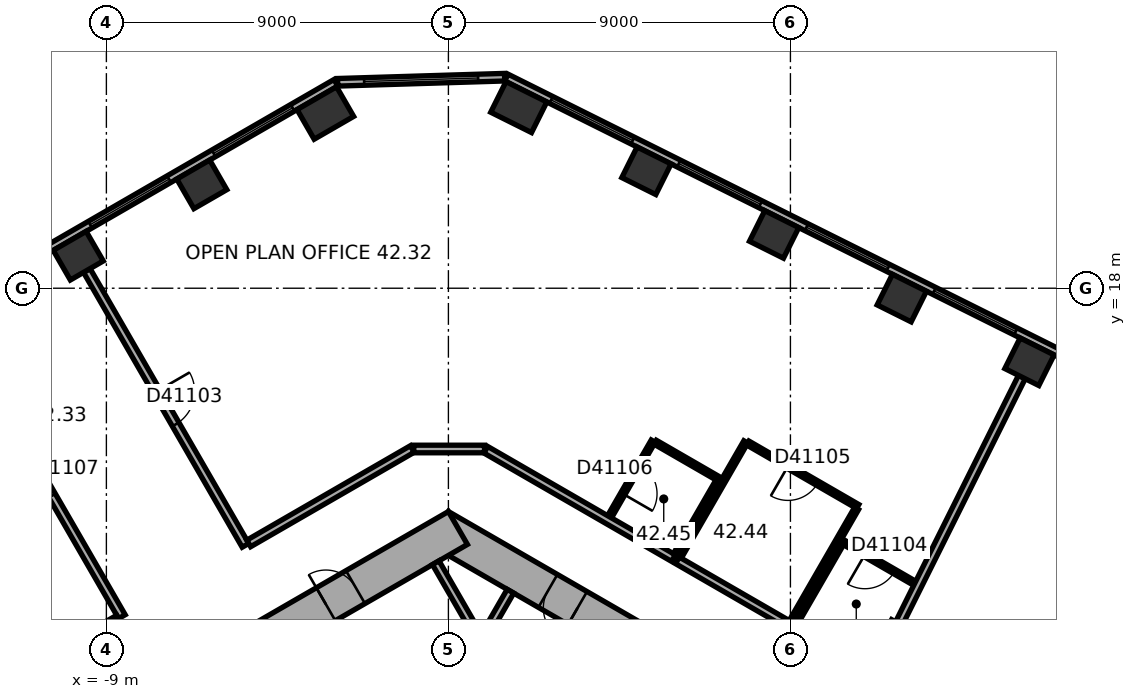
"""IFC4 building model, lengths in metres.
Left out: names, types, materials, properties, quantities, classifications, styles, units other than length and angle.
Written with IfcOpenShell. Run it as: python <this file> out.ifc"""

import sys

from ifc_helpers import new_model, si_unit, direction, frame, frame_2d, origin, origin_2d, place, context, subcontext, project, spatial, rectangle, extrude, element, fill, save


model = new_model("IFC4")
c1 = context("Model", 3, precision=1e-05, world=origin(), true_north=direction((0.0, 1.0)))
c2 = subcontext(c1, "Body", "Model", "MODEL_VIEW")
j1 = project(units=[si_unit("LENGTHUNIT", "METRE"), si_unit("PLANEANGLEUNIT", "RADIAN")], contexts=[c1])
p1 = place(None, origin())
s1 = spatial("IfcSite", under=j1, at=p1, CompositionType="ELEMENT")
p2 = place(p1, origin())
s2 = spatial("IfcBuilding", under=s1, at=p2, CompositionType="ELEMENT")
p3 = place(p2, frame((0.0, 0.0, 172.5)))
s3 = spatial("IfcBuildingStorey", under=s2, at=p3, CompositionType="ELEMENT", Elevation=172.5)
for number, where, z_axis, x_axis in (
    (1, (15.29, 16.065, 0.0), (0.0, 0.0, 1.0), (-0.895, 0.446, 0.0)),
    (2, (11.931, 17.74, 0.0), (0.0, 0.0, 1.0), (-0.895, 0.446, 0.0)),
    (3, (8.571, 19.416, 0.0), (0.0, 0.0, 1.0), (-0.895, 0.446, 0.0)),
    (4, (5.211, 21.091, 0.0), (0.0, 0.0, 1.0), (-0.895, 0.446, 0.0)),
):
    element("IfcColumn", number, at=place(p3, frame(where, z_axis=z_axis, x_axis=x_axis)), inside=s3, PredefinedType="COLUMN", context=c2, shape_type="SweptSolid", body=[
        extrude(rectangle(XDim=1.0, YDim=0.9, at=origin_2d()), origin(), (0.0, 0.0, 1.0), 3.7),
    ])
for number, where, z_axis, x_axis in (
    (5, (1.852, 22.766, 0.0), (0.0, 0.0, 1.0), (-0.895, 0.446, 0.0)),
    (6, (-3.238, 22.61, 0.0), (0.0, 0.0, 1.0), (-0.866, -0.5, 0.0)),
):
    element("IfcColumn", number, at=place(p3, frame(where, z_axis=z_axis, x_axis=x_axis)), inside=s3, PredefinedType="COLUMN", context=c2, shape_type="SweptSolid", body=[
        extrude(rectangle(XDim=1.2, YDim=0.9, at=origin_2d()), origin(), (0.0, 0.0, 1.0), 3.7),
    ])
for number, where, z_axis, x_axis in (
    (7, (-6.489, 20.733, 0.0), (0.0, 0.0, 1.0), (-0.866, -0.5, 0.0)),
    (8, (-9.74, 18.856, 0.0), (0.0, 0.0, 1.0), (-0.866, -0.5, 0.0)),
):
    element("IfcColumn", number, at=place(p3, frame(where, z_axis=z_axis, x_axis=x_axis)), inside=s3, PredefinedType="COLUMN", context=c2, shape_type="SweptSolid", body=[
        extrude(rectangle(XDim=1.0, YDim=0.9, at=origin_2d()), origin(), (0.0, 0.0, 1.0), 3.7),
    ])
p4 = place(p3, frame((10.25, 5.629, 0.0), z_axis=(0.0, 0.0, 1.0), x_axis=(-0.866022616891, 0.50000482701, 0.0)))
e9 = element("IfcWall", 9, at=p4, inside=s3, PredefinedType="SHEAR", context=c2, shape_type="SweptSolid", body=[
    extrude(rectangle(XDim=12.125, YDim=1.0, at=frame_2d((6.062, 0.0))), origin(), (0.0, 0.0, 1.0), 3.7),
])
p5 = place(p4, frame((4.012, 0.0, 0.0)))
e10 = element("IfcOpeningElement", 10, at=p5, cuts=e9, PredefinedType="OPENING", context=c2, shape_type="SweptSolid", body=[
    extrude(rectangle(XDim=0.9, YDim=2.1, at=frame_2d((0.45, 1.05))), frame((0.0, 0.51, 0.0), z_axis=(0.0, -1.0, 0.0), x_axis=(1.0, 0.0, 0.0)), (0.0, 0.0, 1.0), 1.02),
])
p6 = place(p4, frame((7.912, 0.0, 0.0)))
e11 = element("IfcOpeningElement", 11, at=p6, cuts=e9, PredefinedType="OPENING", context=c2, shape_type="SweptSolid", body=[
    extrude(rectangle(XDim=0.9, YDim=2.1, at=frame_2d((0.45, 1.05))), frame((0.0, 0.51, 0.0), z_axis=(0.0, -1.0, 0.0), x_axis=(1.0, 0.0, 0.0)), (0.0, 0.0, 1.0), 1.02),
])
p7 = place(p3, frame((0.25, 11.691, 0.0), z_axis=(0.0, 0.0, 1.0), x_axis=(-0.866022616891, -0.50000482701, 0.0)))
e12 = element("IfcWall", 12, at=p7, inside=s3, PredefinedType="SHEAR", context=c2, shape_type="SweptSolid", body=[
    extrude(rectangle(XDim=12.125, YDim=1.0, at=frame_2d((6.062, 0.0))), origin(), (0.0, 0.0, 1.0), 3.7),
])
p8 = place(p7, frame((6.262, 0.0, 0.0)))
e13 = element("IfcOpeningElement", 13, at=p8, cuts=e12, PredefinedType="OPENING", context=c2, shape_type="SweptSolid", body=[
    extrude(rectangle(XDim=1.5, YDim=2.1, at=frame_2d((0.75, 1.05))), frame((0.0, 0.51, 0.0), z_axis=(0.0, -1.0, 0.0), x_axis=(1.0, 0.0, 0.0)), (0.0, 0.0, 1.0), 1.02),
])
p9 = place(p7, frame((3.112, 0.0, 0.0)))
e14 = element("IfcOpeningElement", 14, at=p9, cuts=e12, PredefinedType="OPENING", context=c2, shape_type="SweptSolid", body=[
    extrude(rectangle(XDim=0.9, YDim=2.1, at=frame_2d((0.45, 1.05))), frame((0.0, 0.51, 0.0), z_axis=(0.0, -1.0, 0.0), x_axis=(1.0, 0.0, 0.0)), (0.0, 0.0, 1.0), 1.02),
])
p10 = place(p3, frame((19.464, 14.599, 0.0), z_axis=(0.0, 0.0, 1.0), x_axis=(-0.894935755043, 0.446195018289, 0.0)))
e15 = element("IfcWall", 15, at=p10, inside=s3, PredefinedType="STANDARD", context=c2, shape_type="SweptSolid", body=[
    extrude(rectangle(XDim=20.044, YDim=0.2, at=frame_2d((10.022, 0.0))), origin(), (0.0, 0.0, 1.0), 3.7),
])
p11 = place(p10, frame((1.313, 0.0, 0.9)))
e16 = element("IfcOpeningElement", 16, at=p11, cuts=e15, PredefinedType="OPENING", context=c2, shape_type="SweptSolid", body=[
    extrude(rectangle(XDim=2.4, YDim=2.0, at=frame_2d((1.2, 1.0))), frame((0.0, 0.11, 0.0), z_axis=(0.0, -1.0, 0.0), x_axis=(1.0, 0.0, 0.0)), (0.0, 0.0, 1.0), 0.22),
])
p12 = place(p10, frame((5.067, 0.0, 0.9)))
e17 = element("IfcOpeningElement", 17, at=p12, cuts=e15, PredefinedType="OPENING", context=c2, shape_type="SweptSolid", body=[
    extrude(rectangle(XDim=2.4, YDim=2.0, at=frame_2d((1.2, 1.0))), frame((0.0, 0.11, 0.0), z_axis=(0.0, -1.0, 0.0), x_axis=(1.0, 0.0, 0.0)), (0.0, 0.0, 1.0), 0.22),
])
p13 = place(p10, frame((8.821, 0.0, 0.9)))
e18 = element("IfcOpeningElement", 18, at=p13, cuts=e15, PredefinedType="OPENING", context=c2, shape_type="SweptSolid", body=[
    extrude(rectangle(XDim=2.4, YDim=2.0, at=frame_2d((1.2, 1.0))), frame((0.0, 0.11, 0.0), z_axis=(0.0, -1.0, 0.0), x_axis=(1.0, 0.0, 0.0)), (0.0, 0.0, 1.0), 0.22),
])
p14 = place(p10, frame((12.575, 0.0, 0.9)))
e19 = element("IfcOpeningElement", 19, at=p14, cuts=e15, PredefinedType="OPENING", context=c2, shape_type="SweptSolid", body=[
    extrude(rectangle(XDim=2.4, YDim=2.0, at=frame_2d((1.2, 1.0))), frame((0.0, 0.11, 0.0), z_axis=(0.0, -1.0, 0.0), x_axis=(1.0, 0.0, 0.0)), (0.0, 0.0, 1.0), 0.22),
])
p15 = place(p10, frame((16.329, 0.0, 0.9)))
e20 = element("IfcOpeningElement", 20, at=p15, cuts=e15, PredefinedType="OPENING", context=c2, shape_type="SweptSolid", body=[
    extrude(rectangle(XDim=2.4, YDim=2.0, at=frame_2d((1.2, 1.0))), frame((0.0, 0.11, 0.0), z_axis=(0.0, -1.0, 0.0), x_axis=(1.0, 0.0, 0.0)), (0.0, 0.0, 1.0), 0.22),
])
p16 = place(p3, frame((1.479, 23.553, 0.0), z_axis=(0.0, 0.0, 1.0), x_axis=(-0.999534786117, -0.03049936625, 0.0)))
e21 = element("IfcWall", 21, at=p16, inside=s3, PredefinedType="STANDARD", context=c2, shape_type="SweptSolid", body=[
    extrude(rectangle(XDim=4.395, YDim=0.2, at=frame_2d((2.197, 0.0))), origin(), (0.0, 0.0, 1.0), 3.7),
])
p17 = place(p16, frame((0.698, 0.0, 0.9)))
e22 = element("IfcOpeningElement", 22, at=p17, cuts=e21, PredefinedType="OPENING", context=c2, shape_type="SweptSolid", body=[
    extrude(rectangle(XDim=3.0, YDim=2.0, at=frame_2d((1.5, 1.0))), frame((0.0, 0.11, 0.0), z_axis=(0.0, -1.0, 0.0), x_axis=(1.0, 0.0, 0.0)), (0.0, 0.0, 1.0), 0.22),
])
p18 = place(p3, frame((-2.961, 23.405, 0.0), z_axis=(0.0, 0.0, 1.0), x_axis=(-0.866023315909, -0.500003616288, 0.0)))
e23 = element("IfcWall", 23, at=p18, inside=s3, PredefinedType="STANDARD", context=c2, shape_type="SweptSolid", body=[
    extrude(rectangle(XDim=20.044, YDim=0.2, at=frame_2d((10.022, 0.0))), origin(), (0.0, 0.0, 1.0), 3.7),
])
p19 = place(p18, frame((1.314, 0.0, 0.9)))
e24 = element("IfcOpeningElement", 24, at=p19, cuts=e23, PredefinedType="OPENING", context=c2, shape_type="SweptSolid", body=[
    extrude(rectangle(XDim=2.4, YDim=2.0, at=frame_2d((1.2, 1.0))), frame((0.0, 0.11, 0.0), z_axis=(0.0, -1.0, 0.0), x_axis=(1.0, 0.0, 0.0)), (0.0, 0.0, 1.0), 0.22),
])
p20 = place(p18, frame((5.069, 0.0, 0.9)))
e25 = element("IfcOpeningElement", 25, at=p20, cuts=e23, PredefinedType="OPENING", context=c2, shape_type="SweptSolid", body=[
    extrude(rectangle(XDim=2.4, YDim=2.0, at=frame_2d((1.2, 1.0))), frame((0.0, 0.11, 0.0), z_axis=(0.0, -1.0, 0.0), x_axis=(1.0, 0.0, 0.0)), (0.0, 0.0, 1.0), 0.22),
])
p21 = place(p18, frame((8.823, 0.0, 0.9)))
e26 = element("IfcOpeningElement", 26, at=p21, cuts=e23, PredefinedType="OPENING", context=c2, shape_type="SweptSolid", body=[
    extrude(rectangle(XDim=2.4, YDim=2.0, at=frame_2d((1.2, 1.0))), frame((0.0, 0.11, 0.0), z_axis=(0.0, -1.0, 0.0), x_axis=(1.0, 0.0, 0.0)), (0.0, 0.0, 1.0), 0.22),
])
p22 = place(p18, frame((12.577, 0.0, 0.9)))
e27 = element("IfcOpeningElement", 27, at=p22, cuts=e23, PredefinedType="OPENING", context=c2, shape_type="SweptSolid", body=[
    extrude(rectangle(XDim=2.4, YDim=2.0, at=frame_2d((1.2, 1.0))), frame((0.0, 0.11, 0.0), z_axis=(0.0, -1.0, 0.0), x_axis=(1.0, 0.0, 0.0)), (0.0, 0.0, 1.0), 0.22),
])
p23 = place(p18, frame((16.331, 0.0, 0.9)))
e28 = element("IfcOpeningElement", 28, at=p23, cuts=e23, PredefinedType="OPENING", context=c2, shape_type="SweptSolid", body=[
    extrude(rectangle(XDim=2.4, YDim=2.0, at=frame_2d((1.2, 1.0))), frame((0.0, 0.11, 0.0), z_axis=(0.0, -1.0, 0.0), x_axis=(1.0, 0.0, 0.0)), (0.0, 0.0, 1.0), 0.22),
])
p24 = place(p3, frame((0.532, 8.122, 0.0), z_axis=(0.0, 0.0, 1.0), x_axis=(0.500077893725, 0.86598042715, 0.0)))
e29 = element("IfcWall", 29, at=p24, inside=s3, PredefinedType="PARTITIONING", context=c2, shape_type="SweptSolid", body=[
    extrude(rectangle(XDim=2.2, YDim=0.2, at=frame_2d((1.1, 0.0))), origin(), (0.0, 0.0, 1.0), 3.42),
])
p25 = place(p3, frame((0.767, 8.872, 0.0), z_axis=(0.0, 0.0, 1.0), x_axis=(-0.499994660107, 0.866028486751, 0.0)))
e30 = element("IfcWall", 30, at=p25, inside=s3, PredefinedType="PARTITIONING", context=c2, shape_type="SweptSolid", body=[
    extrude(rectangle(XDim=2.2, YDim=0.2, at=frame_2d((1.1, 0.0))), origin(), (0.0, 0.0, 1.0), 3.42),
])
p26 = place(p3, frame((-12.766, 16.589, 0.0), z_axis=(0.0, 0.0, 1.0), x_axis=(0.500010139422, -0.866019549707, 0.0)))
e31 = element("IfcWall", 31, at=p26, inside=s3, PredefinedType="PARTITIONING", context=c2, shape_type="SweptSolid", body=[
    extrude(rectangle(XDim=8.35, YDim=0.2, at=frame_2d((4.175, 0.0))), origin(), (0.0, 0.0, 1.0), 3.42),
])
p27 = place(p26, frame((3.675, 0.0, 0.0)))
e32 = element("IfcOpeningElement", 32, at=p27, cuts=e31, PredefinedType="OPENING", context=c2, shape_type="SweptSolid", body=[
    extrude(rectangle(XDim=1.0, YDim=2.1, at=frame_2d((0.5, 1.05))), frame((0.0, 0.11, 0.0), z_axis=(0.0, -1.0, 0.0), x_axis=(1.0, 0.0, 0.0)), (0.0, 0.0, 1.0), 0.22),
])
p28 = place(p3, frame((-9.515, 18.466, 0.0), z_axis=(0.0, 0.0, 1.0), x_axis=(0.500010139422, -0.866019549707, 0.0)))
e33 = element("IfcWall", 33, at=p28, inside=s3, PredefinedType="PARTITIONING", context=c2, shape_type="SweptSolid", body=[
    extrude(rectangle(XDim=8.35, YDim=0.2, at=frame_2d((4.175, 0.0))), origin(), (0.0, 0.0, 1.0), 2.87),
])
p29 = place(p28, frame((3.675, 0.0, 0.0)))
e34 = element("IfcOpeningElement", 34, at=p29, cuts=e33, PredefinedType="OPENING", context=c2, shape_type="SweptSolid", body=[
    extrude(rectangle(XDim=1.0, YDim=2.1, at=frame_2d((0.5, 1.05))), frame((0.0, 0.11, 0.0), z_axis=(0.0, -1.0, 0.0), x_axis=(1.0, 0.0, 0.0)), (0.0, 0.0, 1.0), 0.22),
])
p30 = place(p3, frame((-8.678, 9.308, 0.0), z_axis=(0.0, 0.0, 1.0), x_axis=(-0.866000359435, -0.500043375578, 0.0)))
e35 = element("IfcWall", 35, at=p30, inside=s3, PredefinedType="PARTITIONING", context=c2, shape_type="SweptSolid", body=[
    extrude(rectangle(XDim=3.161, YDim=0.2, at=frame_2d((1.581, 0.0))), origin(), (0.0, 0.0, 1.0), 3.42),
])
p31 = place(p3, frame((-0.95, 13.77, 0.0), z_axis=(0.0, 0.0, 1.0), x_axis=(-0.866036689987, -0.499980451214, 0.0)))
e36 = element("IfcWall", 36, at=p31, inside=s3, PredefinedType="PARTITIONING", context=c2, shape_type="SweptSolid", body=[
    extrude(rectangle(XDim=4.969, YDim=0.2, at=frame_2d((2.485, 0.0))), origin(), (0.0, 0.0, 1.0), 3.42),
])
p32 = place(p3, frame((0.95, 13.77, 0.0), z_axis=(0.0, 0.0, 1.0), x_axis=(-1.0, 0.0, 0.0)))
e37 = element("IfcWall", 37, at=p32, inside=s3, PredefinedType="PARTITIONING", context=c2, shape_type="SweptSolid", body=[
    extrude(rectangle(XDim=1.86, YDim=0.2, at=frame_2d((0.93, 0.0))), origin(), (0.0, 0.0, 1.0), 3.42),
])
p33 = place(p3, frame((4.24, 11.986, 0.0), z_axis=(0.0, 0.0, 1.0), x_axis=(0.499952165731, 0.866053019151, 0.0)))
e38 = element("IfcWall", 38, at=p33, inside=s3, PredefinedType="PARTITIONING", context=c2, shape_type="SweptSolid", body=[
    extrude(rectangle(XDim=2.3, YDim=0.12, at=frame_2d((1.15, 0.0))), origin(), (0.0, 0.0, 1.0), 3.42),
])
p34 = place(p33, frame((0.7, 0.0, 0.0)))
e39 = element("IfcOpeningElement", 39, at=p34, cuts=e38, PredefinedType="OPENING", context=c2, shape_type="SweptSolid", body=[
    extrude(rectangle(XDim=0.9, YDim=2.1, at=frame_2d((0.45, 1.05))), frame((0.0, 0.07, 0.0), z_axis=(0.0, -1.0, 0.0), x_axis=(1.0, 0.0, 0.0)), (0.0, 0.0, 1.0), 0.14),
])
p35 = place(p3, frame((5.442, 13.948, 0.0), z_axis=(0.0, 0.0, 1.0), x_axis=(0.866043088465, -0.499969367985, 0.0)))
e40 = element("IfcWall", 40, at=p35, inside=s3, PredefinedType="PARTITIONING", context=c2, shape_type="SweptSolid", body=[
    extrude(rectangle(XDim=1.94, YDim=0.12, at=frame_2d((0.97, 0.0))), origin(), (0.0, 0.0, 1.0), 3.42),
])
p36 = place(p3, frame((5.922, 10.899, 0.0), z_axis=(0.0, 0.0, 1.0), x_axis=(-0.866031556924, 0.499989342298, 0.0)))
e41 = element("IfcWall", 41, at=p36, inside=s3, PredefinedType="PARTITIONING", context=c2, shape_type="SweptSolid", body=[
    extrude(rectangle(XDim=5.701, YDim=0.2, at=frame_2d((2.851, 0.0))), origin(), (0.0, 0.0, 1.0), 3.42),
])
p37 = place(p3, frame((6.076, 10.926, 0.0), z_axis=(0.0, 0.0, 1.0), x_axis=(0.500010275428, 0.866019471182, 0.0)))
e42 = element("IfcWall", 42, at=p37, inside=s3, PredefinedType="PARTITIONING", context=c2, shape_type="SweptSolid", body=[
    extrude(rectangle(XDim=3.5, YDim=0.12, at=frame_2d((1.75, 0.0))), origin(), (0.0, 0.0, 1.0), 3.42),
])
p38 = place(p3, frame((7.092, 12.926, 0.0), z_axis=(0.0, 0.0, 1.0), x_axis=(-0.500030632641, -0.866007717299, 0.0)))
e43 = element("IfcWall", 43, at=p38, inside=s3, PredefinedType="PARTITIONING", context=c2, shape_type="SweptSolid", body=[
    extrude(rectangle(XDim=2.24, YDim=0.12, at=frame_2d((1.12, 0.0))), origin(), (0.0, 0.0, 1.0), 3.42),
])
p39 = place(p3, frame((7.878, 13.927, 0.0), z_axis=(0.0, 0.0, 1.0), x_axis=(0.866021245731, -0.500007201891, 0.0)))
e44 = element("IfcWall", 44, at=p39, inside=s3, PredefinedType="PARTITIONING", context=c2, shape_type="SweptSolid", body=[
    extrude(rectangle(XDim=3.34, YDim=0.12, at=frame_2d((1.67, 0.0))), origin(), (0.0, 0.0, 1.0), 3.42),
])
p40 = place(p39, frame((1.22, 0.0, 0.0)))
e45 = element("IfcOpeningElement", 45, at=p40, cuts=e44, PredefinedType="OPENING", context=c2, shape_type="SweptSolid", body=[
    extrude(rectangle(XDim=0.9, YDim=2.1, at=frame_2d((0.45, 1.05))), frame((0.0, 0.07, 0.0), z_axis=(0.0, -1.0, 0.0), x_axis=(1.0, 0.0, 0.0)), (0.0, 0.0, 1.0), 0.14),
])
p41 = place(p3, frame((8.971, 9.139, 0.0), z_axis=(0.0, 0.0, 1.0), x_axis=(-0.866038511948, 0.499977295307, 0.0)))
e46 = element("IfcWall", 46, at=p41, inside=s3, PredefinedType="PARTITIONING", context=c2, shape_type="SweptSolid", body=[
    extrude(rectangle(XDim=3.4, YDim=0.2, at=frame_2d((1.7, 0.0))), origin(), (0.0, 0.0, 1.0), 3.42),
])
p42 = place(p3, frame((9.125, 9.166, 0.0), z_axis=(0.0, 0.0, 1.0), x_axis=(0.500004234368, 0.866022959057, 0.0)))
e47 = element("IfcWall", 47, at=p42, inside=s3, PredefinedType="PARTITIONING", context=c2, shape_type="SweptSolid", body=[
    extrude(rectangle(XDim=2.5, YDim=0.12, at=frame_2d((1.25, 0.0))), origin(), (0.0, 0.0, 1.0), 3.42),
])
p43 = place(p3, frame((10.427, 11.301, 0.0), z_axis=(0.0, 0.0, 1.0), x_axis=(0.866019511163, -0.500010206181, 0.0)))
e48 = element("IfcWall", 48, at=p43, inside=s3, PredefinedType="PARTITIONING", context=c2, shape_type="SweptSolid", body=[
    extrude(rectangle(XDim=2.13, YDim=0.12, at=frame_2d((1.065, 0.0))), origin(), (0.0, 0.0, 1.0), 3.42),
])
p44 = place(p43, frame((0.615, 0.0, 0.0)))
e49 = element("IfcOpeningElement", 49, at=p44, cuts=e48, PredefinedType="OPENING", context=c2, shape_type="SweptSolid", body=[
    extrude(rectangle(XDim=0.9, YDim=2.1, at=frame_2d((0.45, 1.05))), frame((0.0, 0.07, 0.0), z_axis=(0.0, -1.0, 0.0), x_axis=(1.0, 0.0, 0.0)), (0.0, 0.0, 1.0), 0.14),
])
p45 = place(p3, frame((10.74, 12.205, 0.0), z_axis=(0.0, 0.0, 1.0), x_axis=(-0.499978425106, -0.866037859697, 0.0)))
e50 = element("IfcWall", 50, at=p45, inside=s3, PredefinedType="PARTITIONING", context=c2, shape_type="SweptSolid", body=[
    extrude(rectangle(XDim=3.44, YDim=0.12, at=frame_2d((1.72, 0.0))), origin(), (0.0, 0.0, 1.0), 3.42),
])
p46 = place(p3, frame((15.09, 15.663, 0.0), z_axis=(0.0, 0.0, 1.0), x_axis=(-0.446206011687, -0.894930273895, 0.0)))
e51 = element("IfcWall", 51, at=p46, inside=s3, PredefinedType="PARTITIONING", context=c2, shape_type="SweptSolid", body=[
    extrude(rectangle(XDim=8.725, YDim=0.2, at=frame_2d((4.363, 0.0))), origin(), (0.0, 0.0, 1.0), 3.42),
])
p47 = place(p12, origin())
e52 = element("IfcWindow", 52, at=p47, inside=s3, PartitioningType="SINGLE_PANEL", PredefinedType="WINDOW", context=c2, shape_type="SweptSolid", body=[
    extrude(rectangle(XDim=2.4, YDim=2.0, at=frame_2d((1.2, 1.0))), frame((0.0, 0.03, 0.0), z_axis=(0.0, -1.0, 0.0), x_axis=(1.0, 0.0, 0.0)), (0.0, 0.0, 1.0), 0.06),
])
fill(e17, e52)
p48 = place(p13, origin())
e53 = element("IfcWindow", 53, at=p48, inside=s3, PartitioningType="SINGLE_PANEL", PredefinedType="WINDOW", context=c2, shape_type="SweptSolid", body=[
    extrude(rectangle(XDim=2.4, YDim=2.0, at=frame_2d((1.2, 1.0))), frame((0.0, 0.03, 0.0), z_axis=(0.0, -1.0, 0.0), x_axis=(1.0, 0.0, 0.0)), (0.0, 0.0, 1.0), 0.06),
])
fill(e18, e53)
p49 = place(p14, origin())
e54 = element("IfcWindow", 54, at=p49, inside=s3, PartitioningType="SINGLE_PANEL", PredefinedType="WINDOW", context=c2, shape_type="SweptSolid", body=[
    extrude(rectangle(XDim=2.4, YDim=2.0, at=frame_2d((1.2, 1.0))), frame((0.0, 0.03, 0.0), z_axis=(0.0, -1.0, 0.0), x_axis=(1.0, 0.0, 0.0)), (0.0, 0.0, 1.0), 0.06),
])
fill(e19, e54)
p50 = place(p15, origin())
e55 = element("IfcWindow", 55, at=p50, inside=s3, PartitioningType="SINGLE_PANEL", PredefinedType="WINDOW", context=c2, shape_type="SweptSolid", body=[
    extrude(rectangle(XDim=2.4, YDim=2.0, at=frame_2d((1.2, 1.0))), frame((0.0, 0.03, 0.0), z_axis=(0.0, -1.0, 0.0), x_axis=(1.0, 0.0, 0.0)), (0.0, 0.0, 1.0), 0.06),
])
fill(e20, e55)
p51 = place(p17, origin())
e56 = element("IfcWindow", 56, at=p51, inside=s3, PartitioningType="SINGLE_PANEL", PredefinedType="WINDOW", context=c2, shape_type="SweptSolid", body=[
    extrude(rectangle(XDim=3.0, YDim=2.0, at=frame_2d((1.5, 1.0))), frame((0.0, 0.03, 0.0), z_axis=(0.0, -1.0, 0.0), x_axis=(1.0, 0.0, 0.0)), (0.0, 0.0, 1.0), 0.06),
])
fill(e22, e56)
p52 = place(p19, origin())
e57 = element("IfcWindow", 57, at=p52, inside=s3, PartitioningType="SINGLE_PANEL", PredefinedType="WINDOW", context=c2, shape_type="SweptSolid", body=[
    extrude(rectangle(XDim=2.4, YDim=2.0, at=frame_2d((1.2, 1.0))), frame((0.0, 0.03, 0.0), z_axis=(0.0, -1.0, 0.0), x_axis=(1.0, 0.0, 0.0)), (0.0, 0.0, 1.0), 0.06),
])
fill(e24, e57)
p53 = place(p20, origin())
e58 = element("IfcWindow", 58, at=p53, inside=s3, PartitioningType="SINGLE_PANEL", PredefinedType="WINDOW", context=c2, shape_type="SweptSolid", body=[
    extrude(rectangle(XDim=2.4, YDim=2.0, at=frame_2d((1.2, 1.0))), frame((0.0, 0.03, 0.0), z_axis=(0.0, -1.0, 0.0), x_axis=(1.0, 0.0, 0.0)), (0.0, 0.0, 1.0), 0.06),
])
fill(e25, e58)
p54 = place(p6, origin())
e59 = element("IfcDoor", 59, at=p54, inside=s3, OperationType="SINGLE_SWING_LEFT", PredefinedType="DOOR", context=c2, shape_type="SweptSolid", body=[
    extrude(rectangle(XDim=0.9, YDim=2.1, at=frame_2d((0.45, 1.05))), frame((0.0, 0.025, 0.0), z_axis=(0.0, -1.0, 0.0), x_axis=(1.0, 0.0, 0.0)), (0.0, 0.0, 1.0), 0.05),
])
fill(e11, e59)
p55 = place(p9, origin())
e60 = element("IfcDoor", 60, at=p55, inside=s3, OperationType="SINGLE_SWING_LEFT", PredefinedType="DOOR", context=c2, shape_type="SweptSolid", body=[
    extrude(rectangle(XDim=0.9, YDim=2.1, at=frame_2d((0.45, 1.05))), frame((0.0, 0.025, 0.0), z_axis=(0.0, -1.0, 0.0), x_axis=(1.0, 0.0, 0.0)), (0.0, 0.0, 1.0), 0.05),
])
fill(e14, e60)
p56 = place(p29, origin())
e61 = element("IfcDoor", 61, at=p56, inside=s3, OperationType="SINGLE_SWING_LEFT", PredefinedType="DOOR", context=c2, shape_type="SweptSolid", body=[
    extrude(rectangle(XDim=1.0, YDim=2.1, at=frame_2d((0.5, 1.05))), frame((0.0, 0.025, 0.0), z_axis=(0.0, -1.0, 0.0), x_axis=(1.0, 0.0, 0.0)), (0.0, 0.0, 1.0), 0.05),
])
fill(e34, e61)
p57 = place(p44, origin())
e62 = element("IfcDoor", 62, at=p57, inside=s3, OperationType="SINGLE_SWING_LEFT", PredefinedType="DOOR", context=c2, shape_type="SweptSolid", body=[
    extrude(rectangle(XDim=0.9, YDim=2.1, at=frame_2d((0.45, 1.05))), frame((0.0, 0.025, 0.0), z_axis=(0.0, -1.0, 0.0), x_axis=(1.0, 0.0, 0.0)), (0.0, 0.0, 1.0), 0.05),
])
fill(e49, e62)
p58 = place(p40, origin())
e63 = element("IfcDoor", 63, at=p58, inside=s3, OperationType="SINGLE_SWING_LEFT", PredefinedType="DOOR", context=c2, shape_type="SweptSolid", body=[
    extrude(rectangle(XDim=0.9, YDim=2.1, at=frame_2d((0.45, 1.05))), frame((0.0, 0.025, 0.0), z_axis=(0.0, -1.0, 0.0), x_axis=(1.0, 0.0, 0.0)), (0.0, 0.0, 1.0), 0.05),
])
fill(e45, e63)
p59 = place(p34, origin())
e64 = element("IfcDoor", 64, at=p59, inside=s3, OperationType="SINGLE_SWING_LEFT", PredefinedType="DOOR", context=c2, shape_type="SweptSolid", body=[
    extrude(rectangle(XDim=0.9, YDim=2.1, at=frame_2d((0.45, 1.05))), frame((0.0, 0.025, 0.0), z_axis=(0.0, -1.0, 0.0), x_axis=(1.0, 0.0, 0.0)), (0.0, 0.0, 1.0), 0.05),
])
fill(e39, e64)
p60 = place(p27, origin())
e65 = element("IfcDoor", 65, at=p60, inside=s3, OperationType="SINGLE_SWING_LEFT", PredefinedType="DOOR", context=c2, shape_type="SweptSolid", body=[
    extrude(rectangle(XDim=1.0, YDim=2.1, at=frame_2d((0.5, 1.05))), frame((0.0, 0.025, 0.0), z_axis=(0.0, -1.0, 0.0), x_axis=(1.0, 0.0, 0.0)), (0.0, 0.0, 1.0), 0.05),
])
fill(e32, e65)
save(model, sys.argv[1])
